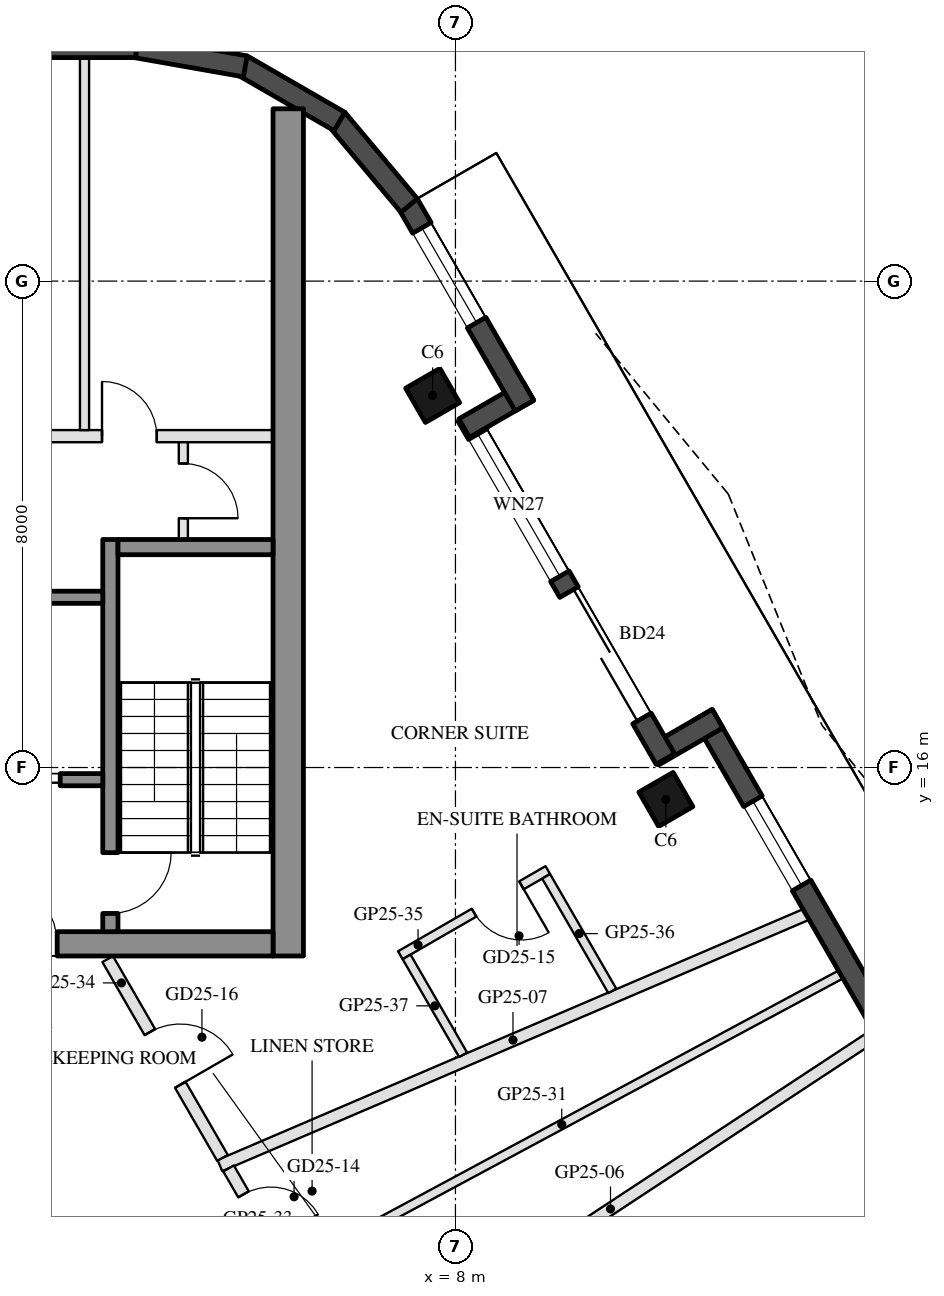
"""IFC4 building model, lengths in metres.
Left out: names, types, materials, properties, quantities, classifications, styles, units other than length and angle.
Written with IfcOpenShell. Run it as: python <this file> out.ifc"""

import sys

from ifc_helpers import new_model, si_unit, direction, frame, frame_2d, origin, origin_2d, place, context, subcontext, project, spatial, rectangle, hollow_rectangle, extrude, boolean, halfspace, element, fill, save


model = new_model("IFC4")
c1 = context("Model", 3, precision=1e-05, world=origin(), true_north=direction((0.0, 1.0)))
c2 = subcontext(c1, "Body", "Model", "MODEL_VIEW")
j1 = project(units=[si_unit("LENGTHUNIT", "METRE"), si_unit("PLANEANGLEUNIT", "RADIAN")], contexts=[c1])
p1 = place(None, origin())
s1 = spatial("IfcSite", under=j1, at=p1, CompositionType="ELEMENT")
p2 = place(p1, origin())
s2 = spatial("IfcBuilding", under=s1, at=p2, CompositionType="ELEMENT")
p3 = place(p2, frame((0.0, 0.0, 257.8)))
s3 = spatial("IfcBuildingStorey", under=s2, at=p3, CompositionType="ELEMENT", Elevation=257.8)
p4 = place(p3, frame((11.461, 15.475, 0.0), z_axis=(0.0, 0.0, 1.0), x_axis=(-0.5, 0.866025403784, 0.0)))
e1 = element("IfcColumn", 1, at=p4, inside=s3, PredefinedType="COLUMN", context=c2, shape_type="SweptSolid", body=[
    boolean("DIFFERENCE", extrude(hollow_rectangle(XDim=0.65, YDim=0.65, WallThickness=0.03, at=origin_2d()), origin(), (0.0, 0.0, 1.0), 3.7), halfspace(frame((0.0, 0.0, 0.04), z_axis=(0.0, 0.0, 1.0), x_axis=(1.0, 0.0, 0.0)), True)),
])
p5 = place(p3, frame((7.625, 22.119, 0.0), z_axis=(0.0, 0.0, 1.0), x_axis=(-0.5, 0.866025403784, 0.0)))
e2 = element("IfcColumn", 2, at=p5, inside=s3, PredefinedType="COLUMN", context=c2, shape_type="SweptSolid", body=[
    boolean("DIFFERENCE", extrude(hollow_rectangle(XDim=0.65, YDim=0.65, WallThickness=0.03, at=origin_2d()), origin(), (0.0, 0.0, 1.0), 3.7), halfspace(frame((0.0, 0.0, 0.047), z_axis=(0.0, 0.0, 1.0), x_axis=(1.0, 0.0, 0.0)), True)),
])
p6 = place(p3, frame((16.807, 8.665, 0.0), z_axis=(0.0, 0.0, 1.0), x_axis=(-0.499992427901, 0.866029775494, 0.0)))
e3 = element("IfcWall", 3, at=p6, inside=s3, PredefinedType="SOLIDWALL", context=c2, shape_type="SweptSolid", body=[
    extrude(rectangle(XDim=9.472, YDim=0.35, at=frame_2d((4.736, 0.0))), origin(), (0.0, 0.0, 1.0), 3.55),
])
p7 = place(p6, frame((1.612, 0.0, 0.0)))
e4 = element("IfcOpeningElement", 4, at=p7, cuts=e3, PredefinedType="OPENING", context=c2, shape_type="SweptSolid", body=[
    extrude(rectangle(XDim=1.4, YDim=2.4, at=frame_2d((0.7, 1.2))), frame((0.0, 0.185, 0.0), z_axis=(0.0, -1.0, 0.0), x_axis=(1.0, 0.0, 0.0)), (0.0, 0.0, 1.0), 0.37),
])
p8 = place(p6, frame((6.23, 0.0, 0.3)))
e5 = element("IfcOpeningElement", 5, at=p8, cuts=e3, PredefinedType="OPENING", context=c2, shape_type="SweptSolid", body=[
    extrude(rectangle(XDim=1.6, YDim=2.65, at=frame_2d((0.8, 1.325))), frame((0.0, 0.185, 0.0), z_axis=(0.0, -1.0, 0.0), x_axis=(1.0, 0.0, 0.0)), (0.0, 0.0, 1.0), 0.37),
])
p9 = place(p3, frame((12.311, 16.803, 0.0), z_axis=(0.0, 0.0, 1.0), x_axis=(-0.866005645448, -0.500034220881, 0.0)))
e6 = element("IfcWall", 6, at=p9, inside=s3, PredefinedType="SOLIDWALL", context=c2, shape_type="SweptSolid", body=[
    extrude(rectangle(XDim=1.22, YDim=0.35, at=frame_2d((0.61, 0.0))), origin(), (0.0, 0.0, 1.0), 3.55),
])
p10 = place(p3, frame((11.452, 16.14, 0.0), z_axis=(0.0, 0.0, 1.0), x_axis=(-0.49998210071, 0.866035737698, 0.0)))
e7 = element("IfcWall", 7, at=p10, inside=s3, PredefinedType="SOLIDWALL", context=c2, shape_type="SweptSolid", body=[
    extrude(rectangle(XDim=6.511, YDim=0.35, at=frame_2d((3.256, 0.0))), origin(), (0.0, 0.0, 1.0), 3.55),
])
p11 = place(p10, frame((0.77, 0.0, 0.0)))
e8 = element("IfcOpeningElement", 8, at=p11, cuts=e7, PredefinedType="OPENING", context=c2, shape_type="SweptSolid", body=[
    extrude(rectangle(XDim=2.4, YDim=2.4, at=frame_2d((1.2, 1.2))), frame((0.0, 0.185, 0.0), z_axis=(0.0, -1.0, 0.0), x_axis=(1.0, 0.0, 0.0)), (0.0, 0.0, 1.0), 0.37),
])
p12 = place(p10, frame((3.47, 0.0, 0.3)))
e9 = element("IfcOpeningElement", 9, at=p12, cuts=e7, PredefinedType="OPENING", context=c2, shape_type="SweptSolid", body=[
    extrude(rectangle(XDim=2.7, YDim=2.65, at=frame_2d((1.35, 1.325))), frame((0.0, 0.185, 0.0), z_axis=(0.0, -1.0, 0.0), x_axis=(1.0, 0.0, 0.0)), (0.0, 0.0, 1.0), 0.37),
])
p13 = place(p3, frame((8.143, 21.582, 0.0), z_axis=(0.0, 0.0, 1.0), x_axis=(0.866092288191, 0.499884134912, 0.0)))
e10 = element("IfcWall", 10, at=p13, inside=s3, PredefinedType="SOLIDWALL", context=c2, shape_type="SweptSolid", body=[
    extrude(rectangle(XDim=1.22, YDim=0.35, at=frame_2d((0.61, 0.0))), origin(), (0.0, 0.0, 1.0), 3.55),
])
p14 = place(p3, frame((9.135, 21.952, 0.0), z_axis=(0.0, 0.0, 1.0), x_axis=(-0.499972675833, 0.866041178825, 0.0)))
e11 = element("IfcWall", 11, at=p14, inside=s3, PredefinedType="SOLIDWALL", context=c2, shape_type="SweptSolid", body=[
    extrude(rectangle(XDim=3.829, YDim=0.35, at=frame_2d((1.915, 0.0))), origin(), (0.0, 0.0, 1.0), 3.55),
])
p15 = place(p14, frame((1.575, 0.0, 0.3)))
e12 = element("IfcOpeningElement", 12, at=p15, cuts=e11, PredefinedType="OPENING", context=c2, shape_type="SweptSolid", body=[
    extrude(rectangle(XDim=1.8, YDim=2.65, at=frame_2d((0.9, 1.325))), frame((0.0, 0.185, 0.0), z_axis=(0.0, -1.0, 0.0), x_axis=(1.0, 0.0, 0.0)), (0.0, 0.0, 1.0), 0.37),
])
p16 = place(p3, frame((7.239, 25.243, 0.0), z_axis=(0.0, 0.0, 1.0), x_axis=(-0.642756798522, 0.7660702957, 0.0)))
e13 = element("IfcWall", 13, at=p16, inside=s3, PredefinedType="SOLIDWALL", context=c2, shape_type="SweptSolid", body=[
    extrude(rectangle(XDim=1.855, YDim=0.35, at=frame_2d((0.928, 0.0))), origin(), (0.0, 0.0, 1.0), 3.55),
])
p17 = place(p3, frame((6.093, 26.625, 0.0), z_axis=(0.0, 0.0, 1.0), x_axis=(-0.866080385203, 0.499904757295, 0.0)))
e14 = element("IfcWall", 14, at=p17, inside=s3, PredefinedType="SOLIDWALL", context=c2, shape_type="SweptSolid", body=[
    extrude(rectangle(XDim=1.855, YDim=0.35, at=frame_2d((0.927, 0.0))), origin(), (0.0, 0.0, 1.0), 3.55),
])
p18 = place(p3, frame((4.544, 27.532, 0.0), z_axis=(0.0, 0.0, 1.0), x_axis=(-0.984795480386, 0.173717764815, 0.0)))
e15 = element("IfcWall", 15, at=p18, inside=s3, PredefinedType="SOLIDWALL", context=c2, shape_type="SweptSolid", body=[
    extrude(rectangle(XDim=1.855, YDim=0.35, at=frame_2d((0.928, 0.0))), origin(), (0.0, 0.0, 1.0), 3.55),
])
p19 = place(p3, frame((2.747, 27.851, 0.0), z_axis=(0.0, 0.0, 1.0), x_axis=(-1.0, 0.0, 0.0)))
e16 = element("IfcWall", 16, at=p19, inside=s3, PredefinedType="SOLIDWALL", context=c2, shape_type="SweptSolid", body=[
    extrude(rectangle(XDim=5.495, YDim=0.35, at=frame_2d((2.747, 0.0))), origin(), (0.0, 0.0, 1.0), 3.55),
])
p20 = place(p3, frame((5.25, 12.9, 0.0), z_axis=(0.0, 0.0, 1.0), x_axis=(0.0, 1.0, 0.0)))
e17 = element("IfcWall", 17, at=p20, inside=s3, PredefinedType="SHEAR", context=c2, shape_type="SweptSolid", body=[
    extrude(rectangle(XDim=13.934, YDim=0.5, at=frame_2d((6.967, 0.0))), origin(), (0.0, 0.0, 1.0), 3.5),
])
p21 = place(p3, frame((5.0, 13.1, 0.0), z_axis=(0.0, 0.0, 1.0), x_axis=(-1.0, 0.0, 0.0)))
e18 = element("IfcWall", 18, at=p21, inside=s3, PredefinedType="SHEAR", context=c2, shape_type="SweptSolid", body=[
    extrude(rectangle(XDim=10.0, YDim=0.4, at=frame_2d((5.0, 0.0))), origin(), (0.0, 0.0, 1.0), 3.5),
])
p22 = place(p21, frame((3.55, 0.0, 0.0)))
e19 = element("IfcOpeningElement", 19, at=p22, cuts=e18, PredefinedType="OPENING", context=c2, shape_type="SweptSolid", body=[
    extrude(rectangle(XDim=1.1, YDim=2.1, at=frame_2d((0.55, 1.05))), frame((0.0, 0.21, 0.0), z_axis=(0.0, -1.0, 0.0), x_axis=(1.0, 0.0, 0.0)), (0.0, 0.0, 1.0), 0.42),
])
p23 = place(p21, frame((5.85, 0.0, 0.0)))
e20 = element("IfcOpeningElement", 20, at=p23, cuts=e18, PredefinedType="OPENING", context=c2, shape_type="SweptSolid", body=[
    extrude(rectangle(XDim=1.4, YDim=2.1, at=frame_2d((0.7, 1.05))), frame((0.0, 0.21, 0.0), z_axis=(0.0, -1.0, 0.0), x_axis=(1.0, 0.0, 0.0)), (0.0, 0.0, 1.0), 0.42),
])
p24 = place(p3, frame((2.325, 13.3, 0.0), z_axis=(0.0, 0.0, 1.0), x_axis=(0.0, 1.0, 0.0)))
e21 = element("IfcWall", 21, at=p24, inside=s3, PredefinedType="SHEAR", context=c2, shape_type="SweptSolid", body=[
    extrude(rectangle(XDim=6.45, YDim=0.25, at=frame_2d((3.225, 0.0))), origin(), (0.0, 0.0, 1.0), 3.5),
])
p25 = place(p24, frame((0.3, 0.0, 0.0)))
e22 = element("IfcOpeningElement", 22, at=p25, cuts=e21, PredefinedType="OPENING", context=c2, shape_type="SweptSolid", body=[
    extrude(rectangle(XDim=1.0, YDim=2.1, at=frame_2d((0.5, 1.05))), frame((0.0, 0.135, 0.0), z_axis=(0.0, -1.0, 0.0), x_axis=(1.0, 0.0, 0.0)), (0.0, 0.0, 1.0), 0.27),
])
p26 = place(p3, frame((5.0, 19.625, 0.0), z_axis=(0.0, 0.0, 1.0), x_axis=(-1.0, 0.0, 0.0)))
e23 = element("IfcWall", 23, at=p26, inside=s3, PredefinedType="SHEAR", context=c2, shape_type="SweptSolid", body=[
    extrude(rectangle(XDim=2.55, YDim=0.25, at=frame_2d((1.275, 0.0))), origin(), (0.0, 0.0, 1.0), 3.5),
])
p27 = place(p3, frame((2.2, 18.8, 0.0), z_axis=(0.0, 0.0, 1.0), x_axis=(-1.0, 0.0, 0.0)))
e24 = element("IfcWall", 24, at=p27, inside=s3, PredefinedType="SHEAR", context=c2, shape_type="SweptSolid", body=[
    extrude(rectangle(XDim=2.8, YDim=0.2, at=frame_2d((1.4, 0.0))), origin(), (0.0, 0.0, 1.0), 3.5),
])
p28 = place(p3, frame((2.2, 15.8, 0.0), z_axis=(0.0, 0.0, 1.0), x_axis=(-1.0, 0.0, 0.0)))
e25 = element("IfcWall", 25, at=p28, inside=s3, PredefinedType="SHEAR", context=c2, shape_type="SweptSolid", body=[
    extrude(rectangle(XDim=2.8, YDim=0.2, at=frame_2d((1.4, 0.0))), origin(), (0.0, 0.0, 1.0), 3.5),
])
p29 = place(p28, frame((0.7, 0.0, 0.0)))
e26 = element("IfcOpeningElement", 26, at=p29, cuts=e25, PredefinedType="OPENING", context=c2, shape_type="SweptSolid", body=[
    extrude(rectangle(XDim=1.2, YDim=2.1, at=frame_2d((0.6, 1.05))), frame((0.0, 0.11, 0.0), z_axis=(0.0, -1.0, 0.0), x_axis=(1.0, 0.0, 0.0)), (0.0, 0.0, 1.0), 0.22),
])
p30 = place(p3, frame((5.0, 21.45, 0.0), z_axis=(0.0, 0.0, 1.0), x_axis=(-1.0, 0.0, 0.0)))
e27 = element("IfcWall", 27, at=p30, inside=s3, PredefinedType="PARTITIONING", context=c2, shape_type="SweptSolid", body=[
    extrude(rectangle(XDim=5.4, YDim=0.2, at=frame_2d((2.7, 0.0))), origin(), (0.0, 0.0, 1.0), 3.5),
])
p31 = place(p30, frame((1.913, 0.0, 0.0)))
e28 = element("IfcOpeningElement", 28, at=p31, cuts=e27, PredefinedType="OPENING", context=c2, shape_type="SweptSolid", body=[
    extrude(rectangle(XDim=0.9, YDim=2.1, at=frame_2d((0.45, 1.05))), frame((0.0, 0.11, 0.0), z_axis=(0.0, -1.0, 0.0), x_axis=(1.0, 0.0, 0.0)), (0.0, 0.0, 1.0), 0.22),
])
p32 = place(p30, frame((3.788, 0.0, 0.0)))
e29 = element("IfcOpeningElement", 29, at=p32, cuts=e27, PredefinedType="OPENING", context=c2, shape_type="SweptSolid", body=[
    extrude(rectangle(XDim=0.9, YDim=2.1, at=frame_2d((0.45, 1.05))), frame((0.0, 0.11, 0.0), z_axis=(0.0, -1.0, 0.0), x_axis=(1.0, 0.0, 0.0)), (0.0, 0.0, 1.0), 0.22),
])
p33 = place(p3, frame((3.525, 19.75, 0.0), z_axis=(0.0, 0.0, 1.0), x_axis=(0.0, 1.0, 0.0)))
e30 = element("IfcWall", 30, at=p33, inside=s3, PredefinedType="PARTITIONING", context=c2, shape_type="SweptSolid", body=[
    extrude(rectangle(XDim=1.6, YDim=0.15, at=frame_2d((0.8, 0.0))), origin(), (0.0, 0.0, 1.0), 3.5),
])
p34 = place(p33, frame((0.35, 0.0, 0.0)))
e31 = element("IfcOpeningElement", 31, at=p34, cuts=e30, PredefinedType="OPENING", context=c2, shape_type="SweptSolid", body=[
    extrude(rectangle(XDim=0.9, YDim=2.1, at=frame_2d((0.45, 1.05))), frame((0.0, 0.085, 0.0), z_axis=(0.0, -1.0, 0.0), x_axis=(1.0, 0.0, 0.0)), (0.0, 0.0, 1.0), 0.17),
])
p35 = place(p3, frame((1.9, 21.55, 0.0), z_axis=(0.0, 0.0, 1.0), x_axis=(0.0, 1.0, 0.0)))
e32 = element("IfcWall", 32, at=p35, inside=s3, PredefinedType="PARTITIONING", context=c2, shape_type="SweptSolid", body=[
    extrude(rectangle(XDim=6.126, YDim=0.15, at=frame_2d((3.063, 0.0))), origin(), (0.0, 0.0, 1.0), 3.5),
])
p36 = place(p3, frame((14.906, 11.608, 0.0), z_axis=(0.0, 0.0, 1.0), x_axis=(-0.835212554653, -0.549927257507, 0.0)))
e33 = element("IfcWall", 33, at=p36, inside=s3, PredefinedType="PARTITIONING", context=c2, shape_type="SweptSolid", body=[
    extrude(rectangle(XDim=10.431, YDim=0.2, at=frame_2d((5.216, 0.0))), origin(), (0.0, 0.0, 1.0), 3.16),
])
p37 = place(p3, frame((13.766, 13.583, 0.0), z_axis=(0.0, 0.0, 1.0), x_axis=(-0.919210042537, -0.393767568115, 0.0)))
e34 = element("IfcWall", 34, at=p37, inside=s3, PredefinedType="PARTITIONING", context=c2, shape_type="SweptSolid", body=[
    extrude(rectangle(XDim=10.487, YDim=0.2, at=frame_2d((5.243, 0.0))), origin(), (0.0, 0.0, 1.0), 3.16),
])
p38 = place(p3, frame((14.336, 12.595, 0.0), z_axis=(0.0, 0.0, 1.0), x_axis=(-0.880794466183, -0.473498794445, 0.0)))
e35 = element("IfcWall", 35, at=p38, inside=s3, PredefinedType="PARTITIONING", context=c2, shape_type="SweptSolid", body=[
    extrude(rectangle(XDim=10.418, YDim=0.15, at=frame_2d((5.209, 0.0))), origin(), (0.0, 0.0, 1.0), 3.0),
])
p39 = place(p3, frame((4.269, 9.406, 0.0), z_axis=(0.0, 0.0, 1.0), x_axis=(0.499973055223, -0.8660409598, 0.0)))
e36 = element("IfcWall", 36, at=p39, inside=s3, PredefinedType="PARTITIONING", context=c2, shape_type="SweptSolid", body=[
    extrude(rectangle(XDim=1.883, YDim=0.2, at=frame_2d((0.942, 0.0))), origin(), (0.0, 0.0, 1.0), 3.55),
])
p40 = place(p39, frame((0.492, 0.0, 0.0)))
e37 = element("IfcOpeningElement", 37, at=p40, cuts=e36, PredefinedType="OPENING", context=c2, shape_type="SweptSolid", body=[
    extrude(rectangle(XDim=0.9, YDim=2.1, at=frame_2d((0.45, 1.05))), frame((0.0, 0.11, 0.0), z_axis=(0.0, -1.0, 0.0), x_axis=(1.0, 0.0, 0.0)), (0.0, 0.0, 1.0), 0.22),
])
p41 = place(p3, frame((2.281, 12.85, 0.0), z_axis=(0.0, 0.0, 1.0), x_axis=(0.499978071388, -0.866038063904, 0.0)))
e38 = element("IfcWall", 38, at=p41, inside=s3, PredefinedType="PARTITIONING", context=c2, shape_type="SweptSolid", body=[
    extrude(rectangle(XDim=3.776, YDim=0.2, at=frame_2d((1.888, 0.0))), origin(), (0.0, 0.0, 1.0), 3.0),
])
p42 = place(p41, frame((1.388, 0.0, 0.0)))
e39 = element("IfcOpeningElement", 39, at=p42, cuts=e38, PredefinedType="OPENING", context=c2, shape_type="SweptSolid", body=[
    extrude(rectangle(XDim=1.0, YDim=2.1, at=frame_2d((0.5, 1.05))), frame((0.0, 0.11, 0.0), z_axis=(0.0, -1.0, 0.0), x_axis=(1.0, 0.0, 0.0)), (0.0, 0.0, 1.0), 0.22),
])
p43 = place(p3, frame((9.519, 14.313, 0.0), z_axis=(0.0, 0.0, 1.0), x_axis=(-0.865996816683, -0.500049511043, 0.0)))
e40 = element("IfcWall", 40, at=p43, inside=s3, PredefinedType="PARTITIONING", context=c2, shape_type="SweptSolid", body=[
    extrude(rectangle(XDim=2.8, YDim=0.15, at=frame_2d((1.4, 0.0))), origin(), (0.0, 0.0, 1.0), 3.0),
])
p44 = place(p43, frame((0.5, 0.0, 0.0)))
e41 = element("IfcOpeningElement", 41, at=p44, cuts=e40, PredefinedType="OPENING", context=c2, shape_type="SweptSolid", body=[
    extrude(rectangle(XDim=0.9, YDim=2.1, at=frame_2d((0.45, 1.05))), frame((0.0, 0.085, 0.0), z_axis=(0.0, -1.0, 0.0), x_axis=(1.0, 0.0, 0.0)), (0.0, 0.0, 1.0), 0.17),
])
p45 = place(p3, frame((10.579, 12.326, 0.0), z_axis=(0.0, 0.0, 1.0), x_axis=(-0.499965319569, 0.866045425615, 0.0)))
e42 = element("IfcWall", 42, at=p45, inside=s3, PredefinedType="PARTITIONING", context=c2, shape_type="SweptSolid", body=[
    extrude(rectangle(XDim=2.176, YDim=0.15, at=frame_2d((1.088, 0.0))), origin(), (0.0, 0.0, 1.0), 3.55),
])
p46 = place(p3, frame((8.126, 11.276, 0.0), z_axis=(0.0, 0.0, 1.0), x_axis=(-0.500093796661, 0.865971243484, 0.0)))
e43 = element("IfcWall", 43, at=p46, inside=s3, PredefinedType="PARTITIONING", context=c2, shape_type="SweptSolid", body=[
    extrude(rectangle(XDim=1.859, YDim=0.15, at=frame_2d((0.93, 0.0))), origin(), (0.0, 0.0, 1.0), 3.55),
])
p47 = place(p8, origin())
e44 = element("IfcWindow", 44, at=p47, inside=s3, PartitioningType="SINGLE_PANEL", PredefinedType="WINDOW", context=c2, shape_type="SweptSolid", body=[
    extrude(rectangle(XDim=1.6, YDim=2.65, at=frame_2d((0.8, 1.325))), frame((0.0, 0.03, 0.0), z_axis=(0.0, -1.0, 0.0), x_axis=(1.0, 0.0, 0.0)), (0.0, 0.0, 1.0), 0.06),
])
fill(e5, e44)
p48 = place(p11, frame((2.4, 0.0, 0.0), z_axis=(0.0, 0.0, 1.0), x_axis=(-1.0, 0.0, 0.0)))
e45 = element("IfcDoor", 45, at=p48, inside=s3, OperationType="SLIDING_TO_LEFT", PredefinedType="DOOR", context=c2, shape_type="SweptSolid", body=[
    extrude(rectangle(XDim=2.4, YDim=2.4, at=frame_2d((1.2, 1.2))), frame((0.0, 0.025, 0.0), z_axis=(0.0, -1.0, 0.0), x_axis=(1.0, 0.0, 0.0)), (0.0, 0.0, 1.0), 0.05),
])
fill(e8, e45)
p49 = place(p12, origin())
e46 = element("IfcWindow", 46, at=p49, inside=s3, PartitioningType="SINGLE_PANEL", PredefinedType="WINDOW", context=c2, shape_type="SweptSolid", body=[
    extrude(rectangle(XDim=2.7, YDim=2.65, at=frame_2d((1.35, 1.325))), frame((0.0, 0.03, 0.0), z_axis=(0.0, -1.0, 0.0), x_axis=(1.0, 0.0, 0.0)), (0.0, 0.0, 1.0), 0.06),
])
fill(e9, e46)
p50 = place(p15, origin())
e47 = element("IfcWindow", 47, at=p50, inside=s3, PartitioningType="SINGLE_PANEL", PredefinedType="WINDOW", context=c2, shape_type="SweptSolid", body=[
    extrude(rectangle(XDim=1.8, YDim=2.65, at=frame_2d((0.9, 1.325))), frame((0.0, 0.03, 0.0), z_axis=(0.0, -1.0, 0.0), x_axis=(1.0, 0.0, 0.0)), (0.0, 0.0, 1.0), 0.06),
])
fill(e12, e47)
p51 = place(p29, origin())
e48 = element("IfcDoor", 48, at=p51, inside=s3, OperationType="DOUBLE_DOOR_SLIDING", PredefinedType="DOOR", context=c2, shape_type="SweptSolid", body=[
    extrude(rectangle(XDim=1.2, YDim=2.1, at=frame_2d((0.6, 1.05))), frame((0.0, 0.025, 0.0), z_axis=(0.0, -1.0, 0.0), x_axis=(1.0, 0.0, 0.0)), (0.0, 0.0, 1.0), 0.05),
])
fill(e26, e48)
p52 = place(p34, frame((0.9, 0.0, 0.0), z_axis=(0.0, 0.0, 1.0), x_axis=(-1.0, 0.0, 0.0)))
e49 = element("IfcDoor", 49, at=p52, inside=s3, OperationType="SINGLE_SWING_RIGHT", PredefinedType="DOOR", context=c2, shape_type="SweptSolid", body=[
    extrude(rectangle(XDim=0.9, YDim=2.1, at=frame_2d((0.45, 1.05))), frame((0.0, 0.025, 0.0), z_axis=(0.0, -1.0, 0.0), x_axis=(1.0, 0.0, 0.0)), (0.0, 0.0, 1.0), 0.05),
])
fill(e31, e49)
p53 = place(p31, frame((0.9, 0.0, 0.0), z_axis=(0.0, 0.0, 1.0), x_axis=(-1.0, 0.0, 0.0)))
e50 = element("IfcDoor", 50, at=p53, inside=s3, OperationType="SINGLE_SWING_LEFT", PredefinedType="DOOR", context=c2, shape_type="SweptSolid", body=[
    extrude(rectangle(XDim=0.9, YDim=2.1, at=frame_2d((0.45, 1.05))), frame((0.0, 0.025, 0.0), z_axis=(0.0, -1.0, 0.0), x_axis=(1.0, 0.0, 0.0)), (0.0, 0.0, 1.0), 0.05),
])
fill(e28, e50)
p54 = place(p22, frame((1.1, 0.0, 0.0), z_axis=(0.0, 0.0, 1.0), x_axis=(-1.0, 0.0, 0.0)))
e51 = element("IfcDoor", 51, at=p54, inside=s3, OperationType="SINGLE_SWING_LEFT", PredefinedType="DOOR", context=c2, shape_type="SweptSolid", body=[
    extrude(rectangle(XDim=1.1, YDim=2.1, at=frame_2d((0.55, 1.05))), frame((0.0, 0.025, 0.0), z_axis=(0.0, -1.0, 0.0), x_axis=(1.0, 0.0, 0.0)), (0.0, 0.0, 1.0), 0.05),
])
fill(e19, e51)
p55 = place(p25, frame((1.0, 0.0, 0.0), z_axis=(0.0, 0.0, 1.0), x_axis=(-1.0, 0.0, 0.0)))
e52 = element("IfcDoor", 52, at=p55, inside=s3, OperationType="SINGLE_SWING_LEFT", PredefinedType="DOOR", context=c2, shape_type="SweptSolid", body=[
    extrude(rectangle(XDim=1.0, YDim=2.1, at=frame_2d((0.5, 1.05))), frame((0.0, 0.025, 0.0), z_axis=(0.0, -1.0, 0.0), x_axis=(1.0, 0.0, 0.0)), (0.0, 0.0, 1.0), 0.05),
])
fill(e22, e52)
p56 = place(p40, origin())
e53 = element("IfcDoor", 53, at=p56, inside=s3, OperationType="SINGLE_SWING_RIGHT", PredefinedType="DOOR", context=c2, shape_type="SweptSolid", body=[
    extrude(rectangle(XDim=0.9, YDim=2.1, at=frame_2d((0.45, 1.05))), frame((0.0, 0.025, 0.0), z_axis=(0.0, -1.0, 0.0), x_axis=(1.0, 0.0, 0.0)), (0.0, 0.0, 1.0), 0.05),
])
fill(e37, e53)
p57 = place(p44, origin())
e54 = element("IfcDoor", 54, at=p57, inside=s3, OperationType="SINGLE_SWING_LEFT", PredefinedType="DOOR", context=c2, shape_type="SweptSolid", body=[
    extrude(rectangle(XDim=0.9, YDim=2.1, at=frame_2d((0.45, 1.05))), frame((0.0, 0.025, 0.0), z_axis=(0.0, -1.0, 0.0), x_axis=(1.0, 0.0, 0.0)), (0.0, 0.0, 1.0), 0.05),
])
fill(e41, e54)
p58 = place(p42, origin())
e55 = element("IfcDoor", 55, at=p58, inside=s3, OperationType="SINGLE_SWING_RIGHT", PredefinedType="DOOR", context=c2, shape_type="SweptSolid", body=[
    extrude(rectangle(XDim=1.0, YDim=2.1, at=frame_2d((0.5, 1.05))), frame((0.0, 0.025, 0.0), z_axis=(0.0, -1.0, 0.0), x_axis=(1.0, 0.0, 0.0)), (0.0, 0.0, 1.0), 0.05),
])
fill(e39, e55)
save(model, sys.argv[1])
